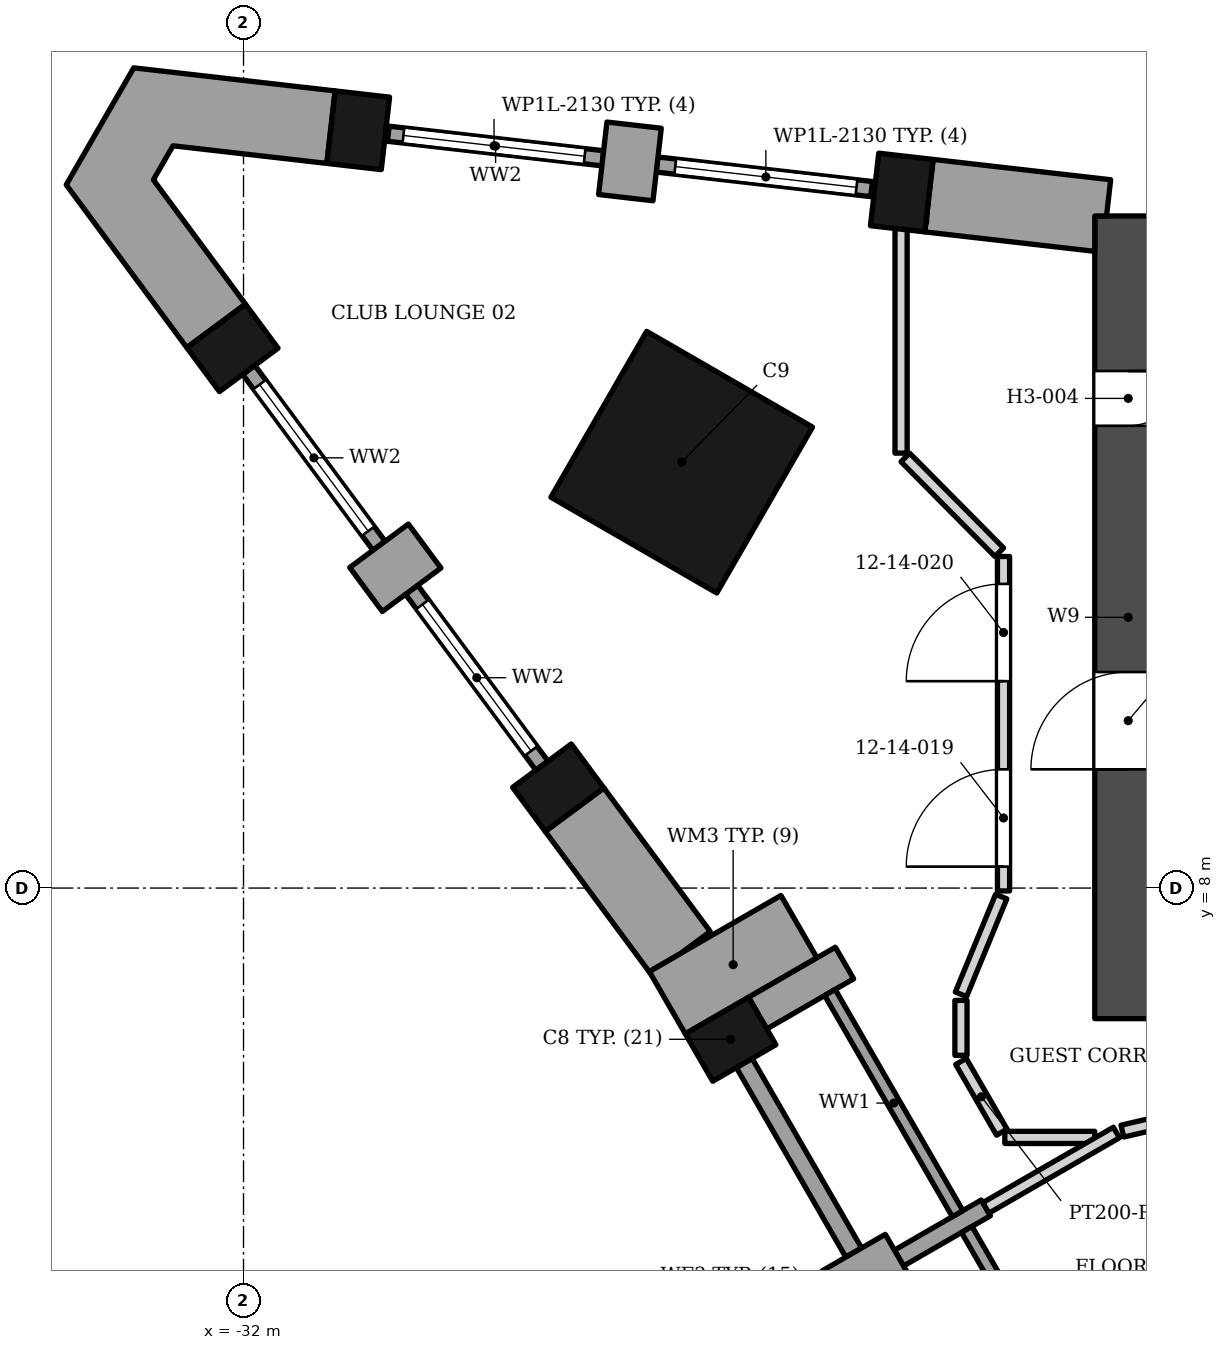
"""IFC4 building model, lengths in metres.
Left out: names, types, materials, properties, quantities, classifications, styles, units other than length and angle.
Written with IfcOpenShell. Run it as: python <this file> out.ifc"""

import sys

from ifc_helpers import new_model, si_unit, direction, frame, frame_2d, origin, origin_2d, place, context, subcontext, project, spatial, polyline, rectangle, outline, extrude, element, fill, save


model = new_model("IFC4")
c1 = context("Model", 3, precision=1e-05, world=origin(), true_north=direction((0.0, 1.0)))
c2 = subcontext(c1, "Body", "Model", "MODEL_VIEW")
j1 = project(units=[si_unit("LENGTHUNIT", "METRE"), si_unit("PLANEANGLEUNIT", "RADIAN")], contexts=[c1])
p1 = place(None, origin())
s1 = spatial("IfcSite", under=j1, at=p1, CompositionType="ELEMENT")
p2 = place(p1, origin())
s2 = spatial("IfcBuilding", under=s1, at=p2, CompositionType="ELEMENT")
p3 = place(p2, frame((0.0, 0.0, 66.4)))
s3 = spatial("IfcBuildingStorey", under=s2, at=p3, CompositionType="ELEMENT", Elevation=66.4)
p4 = place(p3, frame((-17.45, 5.853, 0.0), z_axis=(0.0, 0.0, 1.0), x_axis=(0.0, 1.0, 0.0)))
e1 = element("IfcWall", 1, at=p4, inside=s3, PredefinedType="SHEAR", context=c2, shape_type="SweptSolid", body=[
    extrude(rectangle(XDim=13.2, YDim=1.1, at=frame_2d((6.6, 0.0))), origin(), (0.0, 0.0, 1.0), 3.4),
])
p5 = place(p4, frame((4.1, 0.0, 0.0)))
e2 = element("IfcOpeningElement", 2, at=p5, cuts=e1, PredefinedType="OPENING", context=c2, shape_type="SweptSolid", body=[
    extrude(rectangle(XDim=1.6, YDim=2.1, at=frame_2d((0.8, 1.05))), frame((0.0, 0.56, 0.0), z_axis=(0.0, -1.0, 0.0), x_axis=(1.0, 0.0, 0.0)), (0.0, 0.0, 1.0), 1.12),
])
p6 = place(p4, frame((9.75, 0.0, 0.0)))
e3 = element("IfcOpeningElement", 3, at=p6, cuts=e1, PredefinedType="OPENING", context=c2, shape_type="SweptSolid", body=[
    extrude(rectangle(XDim=0.9, YDim=2.1, at=frame_2d((0.45, 1.05))), frame((0.0, 0.56, 0.0), z_axis=(0.0, -1.0, 0.0), x_axis=(1.0, 0.0, 0.0)), (0.0, 0.0, 1.0), 1.12),
])
p7 = place(p3, frame((-24.793, 15.004, 0.0), z_axis=(0.0, 0.0, 1.0), x_axis=(0.866025412511, -0.499999984885, 0.0)))
e4 = element("IfcColumn", 4, at=p7, inside=s3, PredefinedType="COLUMN", context=c2, shape_type="SweptSolid", body=[
    extrude(rectangle(XDim=3.15, YDim=3.15, at=origin_2d()), origin(), (0.0, 0.0, 1.0), 3.4),
])
for number, where, z_axis, x_axis in (
    (5, (-23.989, 5.513, 0.0), (0.0, 0.0, 1.0), (0.5, -0.866, 0.0)),
    (6, (-21.174, 19.438, 0.0), (0.0, 0.0, 1.0), (-0.994, 0.114, 0.0)),
    (7, (-30.113, 20.462, 0.0), (0.0, 0.0, 1.0), (-0.994, 0.114, 0.0)),
    (8, (-32.182, 16.883, 0.0), (0.0, 0.0, 1.0), (0.595, -0.804, 0.0)),
    (9, (-26.824, 9.651, 0.0), (0.0, 0.0, 1.0), (0.595, -0.804, 0.0)),
):
    element("IfcColumn", number, at=place(p3, frame(where, z_axis=z_axis, x_axis=x_axis)), inside=s3, PredefinedType="COLUMN", context=c2, shape_type="SweptSolid", body=[
        extrude(rectangle(XDim=0.9, YDim=1.2, at=origin_2d()), origin(), (0.0, 0.0, 1.0), 3.4),
    ])
p8 = place(p3, frame((-23.544, 5.943, 0.0), z_axis=(0.0, 0.0, 1.0), x_axis=(0.866030301974, 0.499991515992, 0.0)))
e10 = element("IfcWall", 10, at=p8, inside=s3, PredefinedType="SOLIDWALL", context=c2, shape_type="SweptSolid", body=[
    extrude(rectangle(XDim=1.649, YDim=0.6, at=frame_2d((0.825, 0.0))), origin(), (0.0, 0.0, 1.0), 2.45),
])
p9 = place(p3, frame((-21.22, 1.916, 0.0), z_axis=(0.0, 0.0, 1.0), x_axis=(-0.866006032174, -0.500033551112, 0.0)))
e11 = element("IfcWall", 11, at=p9, inside=s3, PredefinedType="SOLIDWALL", context=c2, shape_type="SweptSolid", body=[
    extrude(rectangle(XDim=1.2, YDim=0.9, at=frame_2d((0.6, 0.0))), origin(), (0.0, 0.0, 1.0), 2.63),
])
p10 = place(p3, frame((-19.791, 2.74, 0.0), z_axis=(0.0, 0.0, 1.0), x_axis=(-0.866040211805, -0.499974350878, 0.0)))
e12 = element("IfcWall", 12, at=p10, inside=s3, PredefinedType="SOLIDWALL", context=c2, shape_type="SweptSolid", body=[
    extrude(rectangle(XDim=1.65, YDim=0.3, at=frame_2d((0.825, 0.0))), origin(), (0.0, 0.0, 1.0), 2.65),
])
p11 = place(p3, frame((-23.764, 5.123, 0.0), z_axis=(0.0, 0.0, 1.0), x_axis=(0.500012057535, -0.866018442252, 0.0)))
e13 = element("IfcWall", 13, at=p11, inside=s3, PredefinedType="SOLIDWALL", context=c2, shape_type="SweptSolid", body=[
    extrude(rectangle(XDim=3.6, YDim=0.3, at=frame_2d((1.8, 0.0))), origin(), (0.0, 0.0, 1.0), 2.63),
])
p12 = place(p3, frame((-22.355, 6.283, 0.0), z_axis=(0.0, 0.0, 1.0), x_axis=(0.49998411664, -0.866034573852, 0.0)))
e14 = element("IfcWall", 14, at=p12, inside=s3, PredefinedType="ELEMENTEDWALL", context=c2, shape_type="SweptSolid", body=[
    extrude(rectangle(XDim=4.2, YDim=0.2, at=frame_2d((2.1, 0.0))), origin(), (0.0, 0.0, 1.0), 2.45),
])
p13 = place(p3, frame((-20.105, 2.385, 0.0), z_axis=(0.0, 0.0, 1.0), x_axis=(0.49998411664, -0.866034573852, 0.0)))
e15 = element("IfcWall", 15, at=p13, inside=s3, PredefinedType="ELEMENTEDWALL", context=c2, shape_type="SweptSolid", body=[
    extrude(rectangle(XDim=4.2, YDim=0.2, at=frame_2d((2.1, 0.0))), origin(), (0.0, 0.0, 1.0), 2.65),
])
p14 = place(p3, frame((-22.865, 7.365, 0.0), z_axis=(0.0, 0.0, 1.0), x_axis=(-0.866022959057, -0.500004234368, 0.0)))
e16 = element("IfcWall", 16, at=p14, inside=s3, PredefinedType="SOLIDWALL", context=c2, shape_type="SweptSolid", body=[
    extrude(rectangle(XDim=2.5, YDim=1.185, at=frame_2d((1.25, 0.0))), origin(), (0.0, 0.0, 1.0), 2.552),
])
p15 = place(p3, frame((-25.713, 19.354, 0.0), z_axis=(0.0, 0.0, 1.0), x_axis=(0.113735952551, 0.993511013073, 0.0)))
e17 = element("IfcWall", 17, at=p15, inside=s3, PredefinedType="SOLIDWALL", context=c2, shape_type="SweptSolid", body=[
    extrude(rectangle(XDim=1.2, YDim=0.9, at=frame_2d((0.6, 0.0))), origin(), (0.0, 0.0, 1.0), 2.63),
])
p16 = place(p3, frame((-21.671, 19.495, 0.0), z_axis=(0.0, 0.0, 1.0), x_axis=(-0.993508501237, 0.113757891902, 0.0)))
e18 = element("IfcWall", 18, at=p16, inside=s3, PredefinedType="ELEMENTEDWALL", context=c2, shape_type="SweptSolid", body=[
    extrude(rectangle(XDim=3.552, YDim=0.25, at=frame_2d((1.776, 0.0))), origin(), (0.0, 0.0, 1.0), 2.63),
])
p17 = place(p16, frame((0.25, 0.0, 0.3)))
e19 = element("IfcOpeningElement", 19, at=p17, cuts=e18, PredefinedType="OPENING", context=c2, shape_type="SweptSolid", body=[
    extrude(rectangle(XDim=3.0, YDim=2.13, at=frame_2d((1.5, 1.065))), frame((0.0, 0.135, 0.0), z_axis=(0.0, -1.0, 0.0), x_axis=(1.0, 0.0, 0.0)), (0.0, 0.0, 1.0), 0.27),
])
p18 = place(p3, frame((-26.09, 20.001, 0.0), z_axis=(0.0, 0.0, 1.0), x_axis=(-0.993509390647, 0.113750123938, 0.0)))
e20 = element("IfcWall", 20, at=p18, inside=s3, PredefinedType="ELEMENTEDWALL", context=c2, shape_type="SweptSolid", body=[
    extrude(rectangle(XDim=3.552, YDim=0.25, at=frame_2d((1.776, 0.0))), origin(), (0.0, 0.0, 1.0), 2.63),
])
p19 = place(p18, frame((0.302, 0.0, 0.3)))
e21 = element("IfcOpeningElement", 21, at=p19, cuts=e20, PredefinedType="OPENING", context=c2, shape_type="SweptSolid", body=[
    extrude(rectangle(XDim=3.0, YDim=2.13, at=frame_2d((1.5, 1.065))), frame((0.0, 0.135, 0.0), z_axis=(0.0, -1.0, 0.0), x_axis=(1.0, 0.0, 0.0)), (0.0, 0.0, 1.0), 0.27),
])
p20 = place(p3, frame((-29.985, 12.91, 0.0), z_axis=(0.0, 0.0, 1.0), x_axis=(0.803477891264, 0.595334593527, 0.0)))
e22 = element("IfcWall", 22, at=p20, inside=s3, PredefinedType="SOLIDWALL", context=c2, shape_type="SweptSolid", body=[
    extrude(rectangle(XDim=1.2, YDim=0.9, at=frame_2d((0.6, 0.0))), origin(), (0.0, 0.0, 1.0), 2.63),
])
p21 = place(p3, frame((-31.914, 16.521, 0.0), z_axis=(0.0, 0.0, 1.0), x_axis=(0.595258366654, -0.803534365742, 0.0)))
e23 = element("IfcWall", 23, at=p21, inside=s3, PredefinedType="ELEMENTEDWALL", context=c2, shape_type="SweptSolid", body=[
    extrude(rectangle(XDim=3.6, YDim=0.25, at=frame_2d((1.8, 0.0))), origin(), (0.0, 0.0, 1.0), 2.63),
])
p22 = place(p21, frame((0.3, 0.0, 0.3)))
e24 = element("IfcOpeningElement", 24, at=p22, cuts=e23, PredefinedType="OPENING", context=c2, shape_type="SweptSolid", body=[
    extrude(rectangle(XDim=3.0, YDim=2.13, at=frame_2d((1.5, 1.065))), frame((0.0, 0.135, 0.0), z_axis=(0.0, -1.0, 0.0), x_axis=(1.0, 0.0, 0.0)), (0.0, 0.0, 1.0), 0.27),
])
p23 = place(p3, frame((-29.235, 12.906, 0.0), z_axis=(0.0, 0.0, 1.0), x_axis=(0.595302153335, -0.803501926715, 0.0)))
e25 = element("IfcWall", 25, at=p23, inside=s3, PredefinedType="ELEMENTEDWALL", context=c2, shape_type="SweptSolid", body=[
    extrude(rectangle(XDim=3.6, YDim=0.25, at=frame_2d((1.8, 0.0))), origin(), (0.0, 0.0, 1.0), 2.63),
])
p24 = place(p23, frame((0.3, 0.0, 0.3)))
e26 = element("IfcOpeningElement", 26, at=p24, cuts=e25, PredefinedType="OPENING", context=c2, shape_type="SweptSolid", body=[
    extrude(rectangle(XDim=3.0, YDim=2.13, at=frame_2d((1.5, 1.065))), frame((0.0, 0.135, 0.0), z_axis=(0.0, -1.0, 0.0), x_axis=(1.0, 0.0, 0.0)), (0.0, 0.0, 1.0), 0.27),
])
p25 = place(p3, origin())
e27 = element("IfcWall", 27, at=p25, inside=s3, PredefinedType="SOLIDWALL", context=c2, shape_type="SweptSolid", body=[
    extrude(outline(polyline([(-20.658, 19.983), (-20.795, 18.791), (-18.0, 18.471), (-18.0, 19.052), (-17.807, 19.052), (-17.739, 19.649), (-20.658, 19.983)])), origin(), (0.0, 0.0, 1.0), 2.65),
])
p26 = place(p3, origin())
e28 = element("IfcWall", 28, at=p26, inside=s3, PredefinedType="SOLIDWALL", context=c2, shape_type="SweptSolid", body=[
    extrude(outline(polyline([(-33.16, 20.207), (-30.631, 19.917), (-30.494, 21.109), (-33.805, 21.489), (-34.916, 19.565), (-32.932, 16.887), (-31.968, 17.602), (-33.483, 19.647), (-33.16, 20.207)])), origin(), (0.0, 0.0, 1.0), 2.65),
])
p27 = place(p3, origin())
e29 = element("IfcWall", 29, at=p27, inside=s3, PredefinedType="SOLIDWALL", context=c2, shape_type="SweptSolid", body=[
    extrude(outline(polyline([(-24.325, 7.285), (-26.074, 9.647), (-26.074, 9.647), (-26.074, 9.646), (-27.038, 8.932), (-25.309, 6.599), (-25.326, 6.628), (-24.807, 6.928), (-24.325, 7.285)])), origin(), (0.0, 0.0, 1.0), 2.63),
])
p28 = place(p3, frame((-17.541, -1.156, 0.0), z_axis=(0.0, 0.0, 1.0), x_axis=(0.865906436394, 0.500206000974, 0.0)))
e30 = element("IfcWall", 30, at=p28, inside=s3, PredefinedType="PARTITIONING", context=c2, shape_type="SweptSolid", body=[
    extrude(rectangle(XDim=6.249, YDim=0.2, at=frame_2d((3.125, 0.0))), origin(), (0.0, 0.0, 1.0), 2.384),
])
p29 = place(p3, frame((-19.479, 3.9, 0.0), z_axis=(0.0, 0.0, 1.0), x_axis=(0.999999986376, -0.000165070978, 0.0)))
e31 = element("IfcWall", 31, at=p29, inside=s3, PredefinedType="PARTITIONING", context=c2, shape_type="SweptSolid", body=[
    extrude(rectangle(XDim=1.479, YDim=0.2, at=frame_2d((0.74, 0.0))), origin(), (0.0, 0.0, 1.0), 3.23),
])
p30 = place(p3, frame((-19.791, 2.74, 0.0), z_axis=(0.0, 0.0, 1.0), x_axis=(0.86605932655, 0.499941239442, 0.0)))
e32 = element("IfcWall", 32, at=p30, inside=s3, PredefinedType="PARTITIONING", context=c2, shape_type="SweptSolid", body=[
    extrude(rectangle(XDim=2.479, YDim=0.2, at=frame_2d((1.24, 0.0))), origin(), (0.0, 0.0, 1.0), 2.702),
])
p31 = place(p3, frame((-17.546, 4.003, 0.0), z_axis=(0.0, 0.0, 1.0), x_axis=(0.974055012808, 0.226311360791, 0.0)))
e33 = element("IfcWall", 33, at=p31, inside=s3, PredefinedType="PARTITIONING", context=c2, shape_type="SweptSolid", body=[
    extrude(rectangle(XDim=1.252, YDim=0.2, at=frame_2d((0.626, 0.0))), origin(), (0.0, 0.0, 1.0), 3.23),
])
p32 = place(p3, frame((-20.2, 5.149, 0.0), z_axis=(0.0, 0.0, 1.0), x_axis=(0.500011000363, -0.866019052629, 0.0)))
e34 = element("IfcWall", 34, at=p32, inside=s3, PredefinedType="PARTITIONING", context=c2, shape_type="SweptSolid", body=[
    extrude(rectangle(XDim=1.343, YDim=0.2, at=frame_2d((0.671, 0.0))), origin(), (0.0, 0.0, 1.0), 3.23),
])
p33 = place(p3, frame((-20.2, 6.153, 0.0), z_axis=(0.0, 0.0, 1.0), x_axis=(0.0, -1.0, 0.0)))
e35 = element("IfcWall", 35, at=p33, inside=s3, PredefinedType="PARTITIONING", context=c2, shape_type="SweptSolid", body=[
    extrude(rectangle(XDim=0.904, YDim=0.2, at=frame_2d((0.452, 0.0))), origin(), (0.0, 0.0, 1.0), 2.45),
])
p34 = place(p3, frame((-20.2, 6.253, 0.0), z_axis=(0.0, 0.0, 1.0), x_axis=(0.380742741509, 0.924681007044, 0.0)))
e36 = element("IfcWall", 36, at=p34, inside=s3, PredefinedType="PARTITIONING", context=c2, shape_type="SweptSolid", body=[
    extrude(rectangle(XDim=1.738, YDim=0.2, at=frame_2d((0.869, 0.0))), origin(), (0.0, 0.0, 1.0), 3.23),
])
p35 = place(p3, frame((-19.5, 7.953, 0.0), z_axis=(0.0, 0.0, 1.0), x_axis=(0.0, 1.0, 0.0)))
e37 = element("IfcWall", 37, at=p35, inside=s3, PredefinedType="PARTITIONING", context=c2, shape_type="SweptSolid", body=[
    extrude(rectangle(XDim=5.5, YDim=0.2, at=frame_2d((2.75, 0.0))), origin(), (0.0, 0.0, 1.0), 3.23),
])
p36 = place(p35, frame((0.4, 0.0, 0.0)))
e38 = element("IfcOpeningElement", 38, at=p36, cuts=e37, PredefinedType="OPENING", context=c2, shape_type="SweptSolid", body=[
    extrude(rectangle(XDim=1.6, YDim=2.1, at=frame_2d((0.8, 1.05))), frame((0.0, 0.11, 0.0), z_axis=(0.0, -1.0, 0.0), x_axis=(1.0, 0.0, 0.0)), (0.0, 0.0, 1.0), 0.22),
])
p37 = place(p35, frame((3.449, 0.0, 0.0)))
e39 = element("IfcOpeningElement", 39, at=p37, cuts=e37, PredefinedType="OPENING", context=c2, shape_type="SweptSolid", body=[
    extrude(rectangle(XDim=1.6, YDim=2.1, at=frame_2d((0.8, 1.05))), frame((0.0, 0.11, 0.0), z_axis=(0.0, -1.0, 0.0), x_axis=(1.0, 0.0, 0.0)), (0.0, 0.0, 1.0), 0.22),
])
p38 = place(p3, frame((-21.115, 15.082, 0.0), z_axis=(0.0, 0.0, 1.0), x_axis=(0.703983957636, -0.710215873796, 0.0)))
e40 = element("IfcWall", 40, at=p38, inside=s3, PredefinedType="PARTITIONING", context=c2, shape_type="SweptSolid", body=[
    extrude(rectangle(XDim=2.194, YDim=0.2, at=frame_2d((1.097, 0.0))), origin(), (0.0, 0.0, 1.0), 3.23),
])
p39 = place(p3, frame((-21.186, 15.153, 0.0), z_axis=(0.0, 0.0, 1.0), x_axis=(6.2601728e-05, 0.999999998041, 0.0)))
e41 = element("IfcWall", 41, at=p39, inside=s3, PredefinedType="PARTITIONING", context=c2, shape_type="SweptSolid", body=[
    extrude(rectangle(XDim=3.9, YDim=0.2, at=frame_2d((1.95, 0.0))), origin(), (0.0, 0.0, 1.0), 3.23),
])
p40 = place(p3, frame((-21.085, 19.052, 0.0), z_axis=(0.0, 0.0, 1.0), x_axis=(0.999999709972, 0.000761614402, 0.0)))
e42 = element("IfcWall", 42, at=p40, inside=s3, PredefinedType="PARTITIONING", context=c2, shape_type="SweptSolid", body=[
    extrude(rectangle(XDim=0.321, YDim=0.2, at=frame_2d((0.16, 0.0))), origin(), (0.0, 0.0, 1.0), 3.23),
])
p41 = place(p17, origin())
e43 = element("IfcWindow", 43, at=p41, inside=s3, PartitioningType="SINGLE_PANEL", PredefinedType="WINDOW", context=c2, shape_type="SweptSolid", body=[
    extrude(rectangle(XDim=3.0, YDim=2.13, at=frame_2d((1.5, 1.065))), frame((0.0, 0.03, 0.0), z_axis=(0.0, -1.0, 0.0), x_axis=(1.0, 0.0, 0.0)), (0.0, 0.0, 1.0), 0.06),
])
fill(e19, e43)
p42 = place(p19, origin())
e44 = element("IfcWindow", 44, at=p42, inside=s3, PartitioningType="SINGLE_PANEL", PredefinedType="WINDOW", context=c2, shape_type="SweptSolid", body=[
    extrude(rectangle(XDim=3.0, YDim=2.13, at=frame_2d((1.5, 1.065))), frame((0.0, 0.03, 0.0), z_axis=(0.0, -1.0, 0.0), x_axis=(1.0, 0.0, 0.0)), (0.0, 0.0, 1.0), 0.06),
])
fill(e21, e44)
p43 = place(p22, origin())
e45 = element("IfcWindow", 45, at=p43, inside=s3, PartitioningType="SINGLE_PANEL", PredefinedType="WINDOW", context=c2, shape_type="SweptSolid", body=[
    extrude(rectangle(XDim=3.0, YDim=2.13, at=frame_2d((1.5, 1.065))), frame((0.0, 0.03, 0.0), z_axis=(0.0, -1.0, 0.0), x_axis=(1.0, 0.0, 0.0)), (0.0, 0.0, 1.0), 0.06),
])
fill(e24, e45)
p44 = place(p24, origin())
e46 = element("IfcWindow", 46, at=p44, inside=s3, PartitioningType="SINGLE_PANEL", PredefinedType="WINDOW", context=c2, shape_type="SweptSolid", body=[
    extrude(rectangle(XDim=3.0, YDim=2.13, at=frame_2d((1.5, 1.065))), frame((0.0, 0.03, 0.0), z_axis=(0.0, -1.0, 0.0), x_axis=(1.0, 0.0, 0.0)), (0.0, 0.0, 1.0), 0.06),
])
fill(e26, e46)
p45 = place(p5, origin())
e47 = element("IfcDoor", 47, at=p45, inside=s3, OperationType="DOUBLE_DOOR_SINGLE_SWING", PredefinedType="DOOR", context=c2, shape_type="SweptSolid", body=[
    extrude(rectangle(XDim=1.6, YDim=2.1, at=frame_2d((0.8, 1.05))), frame((0.0, -0.225, 0.0), z_axis=(0.0, -1.0, 0.0), x_axis=(1.0, 0.0, 0.0)), (0.0, 0.0, 1.0), 0.05),
])
fill(e2, e47)
p46 = place(p6, origin())
e48 = element("IfcDoor", 48, at=p46, inside=s3, OperationType="SINGLE_SWING_RIGHT", PredefinedType="DOOR", context=c2, shape_type="SweptSolid", body=[
    extrude(rectangle(XDim=0.9, YDim=2.1, at=frame_2d((0.45, 1.05))), frame((0.0, -0.225, 0.0), z_axis=(0.0, -1.0, 0.0), x_axis=(1.0, 0.0, 0.0)), (0.0, 0.0, 1.0), 0.05),
])
fill(e3, e48)
p47 = place(p36, origin())
e49 = element("IfcDoor", 49, at=p47, inside=s3, OperationType="DOUBLE_DOOR_SINGLE_SWING", PredefinedType="DOOR", context=c2, shape_type="SweptSolid", body=[
    extrude(rectangle(XDim=1.6, YDim=2.1, at=frame_2d((0.8, 1.05))), frame((0.0, 0.025, 0.0), z_axis=(0.0, -1.0, 0.0), x_axis=(1.0, 0.0, 0.0)), (0.0, 0.0, 1.0), 0.05),
])
fill(e38, e49)
p48 = place(p37, origin())
e50 = element("IfcDoor", 50, at=p48, inside=s3, OperationType="DOUBLE_DOOR_SINGLE_SWING", PredefinedType="DOOR", context=c2, shape_type="SweptSolid", body=[
    extrude(rectangle(XDim=1.6, YDim=2.1, at=frame_2d((0.8, 1.05))), frame((0.0, 0.025, 0.0), z_axis=(0.0, -1.0, 0.0), x_axis=(1.0, 0.0, 0.0)), (0.0, 0.0, 1.0), 0.05),
])
fill(e39, e50)
save(model, sys.argv[1])
